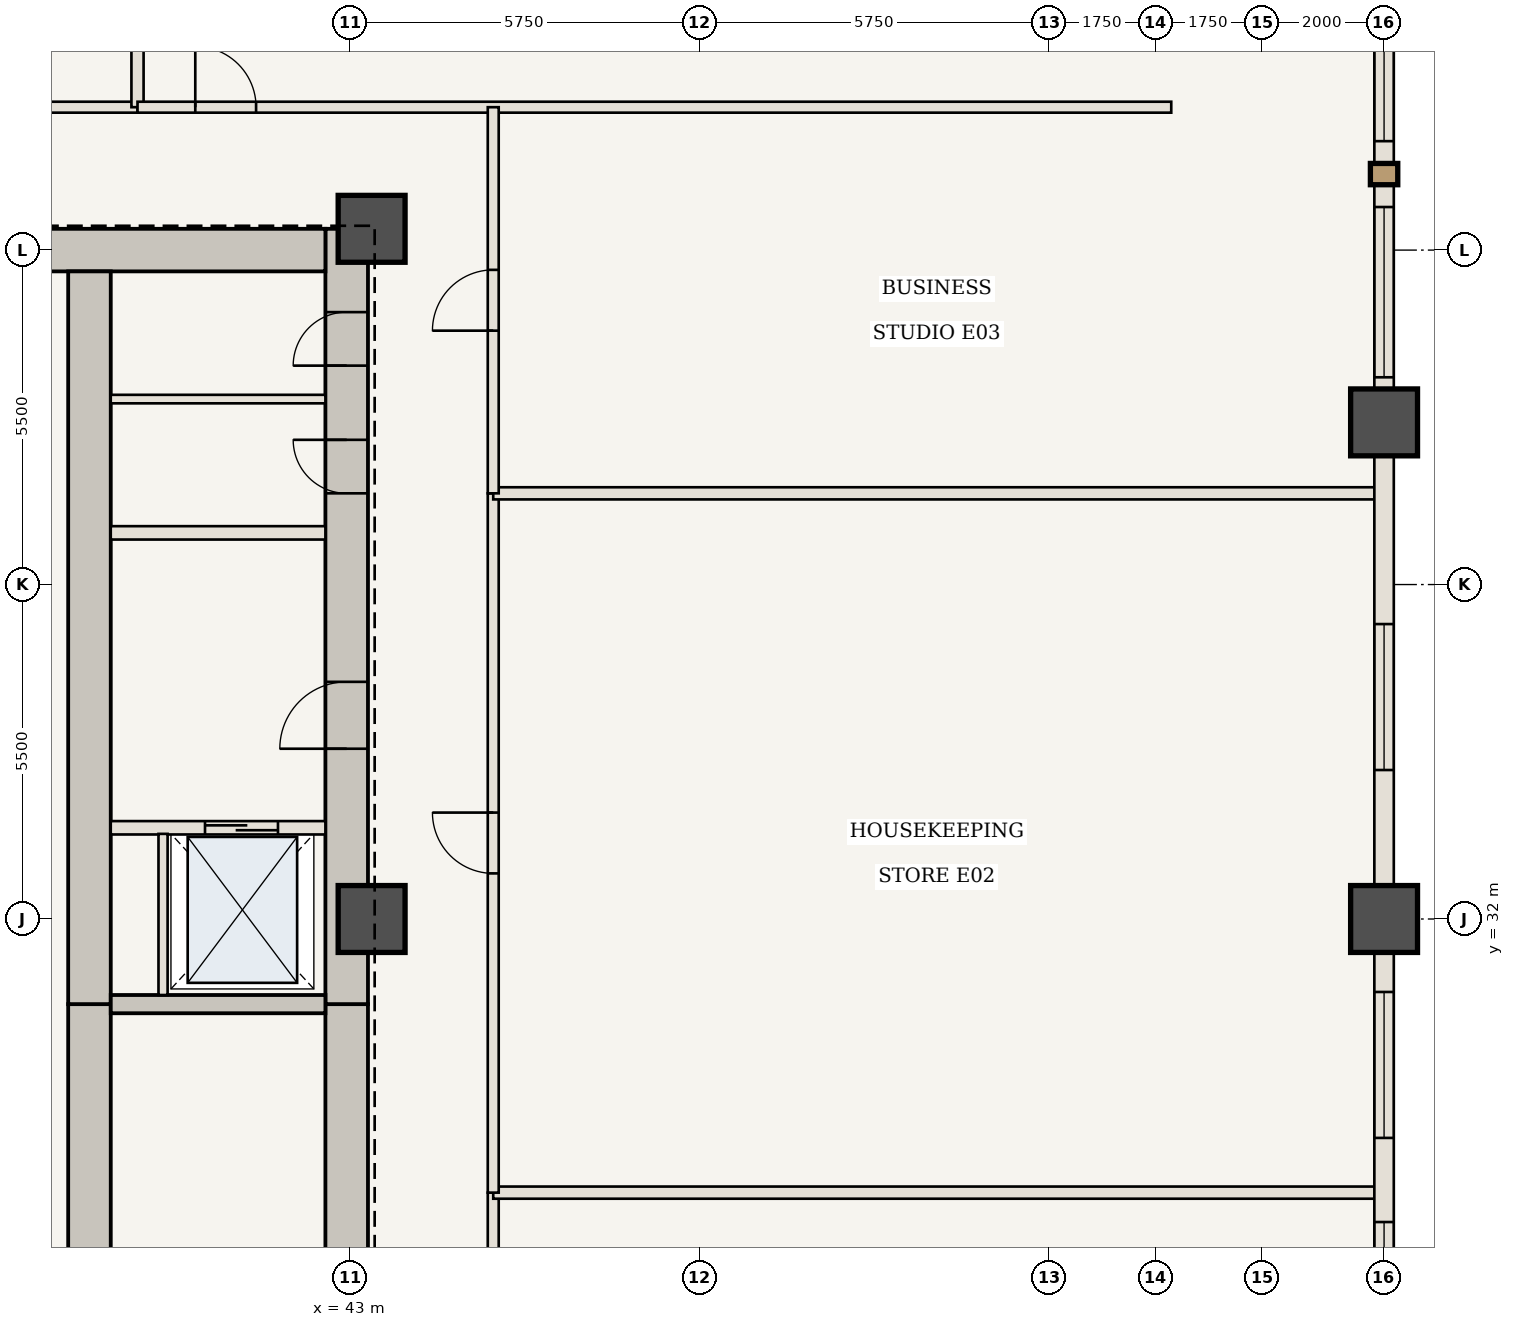
"""IFC4 building model, lengths in metres.
Left out: names, types, materials, properties, quantities, classifications, styles, units other than length and angle.
Written with IfcOpenShell. Run it as: python <this file> out.ifc"""

import sys

from ifc_helpers import new_model, si_unit, direction, frame, frame_2d, origin, origin_2d, place, context, subcontext, project, spatial, rectangle, extrude, element, fill, save


model = new_model("IFC4")
c1 = context("Model", 3, precision=1e-05, world=origin(), true_north=direction((0.0, 1.0)))
c2 = subcontext(c1, "Body", "Model", "MODEL_VIEW")
j1 = project(units=[si_unit("LENGTHUNIT", "METRE"), si_unit("PLANEANGLEUNIT", "RADIAN")], contexts=[c1])
p1 = place(None, origin())
s1 = spatial("IfcSite", under=j1, at=p1, CompositionType="ELEMENT")
p2 = place(p1, origin())
s2 = spatial("IfcBuilding", under=s1, at=p2, CompositionType="ELEMENT")
p3 = place(p2, frame((0.0, 0.0, 59.85)))
s3 = spatial("IfcBuildingStorey", under=s2, at=p3, CompositionType="ELEMENT", Elevation=59.85)
p4 = place(p3, frame((42.94, 20.6, 0.0), z_axis=(0.0, 0.0, 1.0), x_axis=(0.0, 1.0, 0.0)))
e1 = element("IfcWall", 1, at=p4, inside=s3, PredefinedType="SHEAR", context=c2, shape_type="SweptSolid", body=[
    extrude(rectangle(XDim=10.0, YDim=0.7, at=frame_2d((5.0, 0.0))), origin(), (0.0, 0.0, 1.0), 3.5),
])
p5 = place(p4, frame((1.15, 0.0, 0.0)))
e2 = element("IfcOpeningElement", 2, at=p5, cuts=e1, PredefinedType="OPENING", context=c2, shape_type="SweptSolid", body=[
    extrude(rectangle(XDim=1.15, YDim=2.15, at=frame_2d((0.575, 1.075))), frame((0.0, 0.36, 0.0), z_axis=(0.0, -1.0, 0.0), x_axis=(1.0, 0.0, 0.0)), (0.0, 0.0, 1.0), 0.72),
])
p6 = place(p3, frame((42.94, 30.6, 0.0), z_axis=(0.0, 0.0, 1.0), x_axis=(0.0, 1.0, 0.0)))
e3 = element("IfcWall", 3, at=p6, inside=s3, PredefinedType="SHEAR", context=c2, shape_type="SweptSolid", body=[
    extrude(rectangle(XDim=12.75, YDim=0.7, at=frame_2d((6.375, 0.0))), origin(), (0.0, 0.0, 1.0), 3.5),
])
p7 = place(p6, frame((4.2, 0.0, 0.0)))
e4 = element("IfcOpeningElement", 4, at=p7, cuts=e3, PredefinedType="OPENING", context=c2, shape_type="SweptSolid", body=[
    extrude(rectangle(XDim=1.1, YDim=2.15, at=frame_2d((0.55, 1.075))), frame((0.0, 0.36, 0.0), z_axis=(0.0, -1.0, 0.0), x_axis=(1.0, 0.0, 0.0)), (0.0, 0.0, 1.0), 0.72),
])
p8 = place(p6, frame((8.4, 0.0, 0.0)))
e5 = element("IfcOpeningElement", 5, at=p8, cuts=e3, PredefinedType="OPENING", context=c2, shape_type="SweptSolid", body=[
    extrude(rectangle(XDim=0.88, YDim=2.1, at=frame_2d((0.44, 1.05))), frame((0.0, 0.36, 0.0), z_axis=(0.0, -1.0, 0.0), x_axis=(1.0, 0.0, 0.0)), (0.0, 0.0, 1.0), 0.72),
])
p9 = place(p6, frame((10.5, 0.0, 0.0)))
e6 = element("IfcOpeningElement", 6, at=p9, cuts=e3, PredefinedType="OPENING", context=c2, shape_type="SweptSolid", body=[
    extrude(rectangle(XDim=0.88, YDim=2.1, at=frame_2d((0.44, 1.05))), frame((0.0, 0.36, 0.0), z_axis=(0.0, -1.0, 0.0), x_axis=(1.0, 0.0, 0.0)), (0.0, 0.0, 1.0), 0.72),
])
p10 = place(p3, frame((37.75, 43.0, 0.0), z_axis=(0.0, 0.0, 1.0), x_axis=(1.0, 0.0, 0.0)))
e7 = element("IfcWall", 7, at=p10, inside=s3, PredefinedType="SHEAR", context=c2, shape_type="SweptSolid", body=[
    extrude(rectangle(XDim=4.84, YDim=0.7, at=frame_2d((2.42, 0.0))), origin(), (0.0, 0.0, 1.0), 3.5),
])
p11 = place(p3, frame((38.71, 21.3, 0.0), z_axis=(0.0, 0.0, 1.0), x_axis=(0.0, 1.0, 0.0)))
e8 = element("IfcWall", 8, at=p11, inside=s3, PredefinedType="SHEAR", context=c2, shape_type="SweptSolid", body=[
    extrude(rectangle(XDim=9.3, YDim=0.7, at=frame_2d((4.65, 0.0))), origin(), (0.0, 0.0, 1.0), 3.5),
])
p12 = place(p3, frame((38.71, 30.6, 0.0), z_axis=(0.0, 0.0, 1.0), x_axis=(0.0, 1.0, 0.0)))
e9 = element("IfcWall", 9, at=p12, inside=s3, PredefinedType="SHEAR", context=c2, shape_type="SweptSolid", body=[
    extrude(rectangle(XDim=12.05, YDim=0.7, at=frame_2d((6.025, 0.0))), origin(), (0.0, 0.0, 1.0), 3.5),
])
for number, where, z_axis, x_axis in (
    (10, (43.35, 32.0, 0.0), (0.0, 0.0, 1.0), (1.0, 0.0, 0.0)),
    (11, (43.35, 43.35, 0.0), (0.0, 0.0, 1.0), (1.0, 0.0, 0.0)),
    (12, (60.0, 32.0, 0.0), (0.0, 0.0, 1.0), (1.0, 0.0, 0.0)),
    (13, (60.0, 40.167, 0.0), (0.0, 0.0, 1.0), (1.0, 0.0, 0.0)),
):
    element("IfcColumn", number, at=place(p3, frame(where, z_axis=z_axis, x_axis=x_axis)), inside=s3, PredefinedType="COLUMN", context=c2, shape_type="SweptSolid", body=[
        extrude(rectangle(XDim=1.1, YDim=1.1, at=origin_2d()), origin(), (0.0, 0.0, 1.0), 3.5),
    ])
p13 = place(p3, frame((39.06, 30.6, 0.0), z_axis=(0.0, 0.0, 1.0), x_axis=(1.0, 0.0, 0.0)))
e14 = element("IfcWall", 14, at=p13, inside=s3, PredefinedType="SHEAR", context=c2, shape_type="SweptSolid", body=[
    extrude(rectangle(XDim=3.53, YDim=0.3, at=frame_2d((1.765, 0.0))), origin(), (0.0, 0.0, 1.0), 3.32),
])
p14 = place(p3, frame((39.06, 33.5, 0.0), z_axis=(0.0, 0.0, 1.0), x_axis=(1.0, 0.0, 0.0)))
e15 = element("IfcWall", 15, at=p14, inside=s3, PredefinedType="STANDARD", context=c2, shape_type="SweptSolid", body=[
    extrude(rectangle(XDim=3.53, YDim=0.22, at=frame_2d((1.765, 0.0))), origin(), (0.0, 0.0, 1.0), 3.32),
])
p15 = place(p14, frame((1.55, 0.0, 0.0)))
e16 = element("IfcOpeningElement", 16, at=p15, cuts=e15, PredefinedType="OPENING", context=c2, shape_type="SweptSolid", body=[
    extrude(rectangle(XDim=1.2, YDim=2.2, at=frame_2d((0.6, 1.1))), frame((0.0, 0.12, 0.0), z_axis=(0.0, -1.0, 0.0), x_axis=(1.0, 0.0, 0.0)), (0.0, 0.0, 1.0), 0.24),
])
p16 = place(p3, frame((39.92, 30.75, 0.0), z_axis=(0.0, 0.0, 1.0), x_axis=(0.0, 1.0, 0.0)))
e17 = element("IfcWall", 17, at=p16, inside=s3, PredefinedType="STANDARD", context=c2, shape_type="SweptSolid", body=[
    extrude(rectangle(XDim=2.65, YDim=0.15, at=frame_2d((1.325, 0.0))), origin(), (0.0, 0.0, 1.0), 3.32),
])
p17 = place(p3, frame((39.06, 38.35, 0.0), z_axis=(0.0, 0.0, 1.0), x_axis=(1.0, 0.0, 0.0)))
e18 = element("IfcWall", 18, at=p17, inside=s3, PredefinedType="STANDARD", context=c2, shape_type="SweptSolid", body=[
    extrude(rectangle(XDim=3.53, YDim=0.22, at=frame_2d((1.765, 0.0))), origin(), (0.0, 0.0, 1.0), 3.32),
])
p18 = place(p3, frame((39.06, 40.55, 0.0), z_axis=(0.0, 0.0, 1.0), x_axis=(1.0, 0.0, 0.0)))
e19 = element("IfcWall", 19, at=p18, inside=s3, PredefinedType="STANDARD", context=c2, shape_type="SweptSolid", body=[
    extrude(rectangle(XDim=3.53, YDim=0.14, at=frame_2d((1.765, 0.0))), origin(), (0.0, 0.0, 1.0), 3.32),
])
p19 = place(p3, frame((25.5, 45.35, 0.0), z_axis=(0.0, 0.0, 1.0), x_axis=(1.0, 0.0, 0.0)))
e20 = element("IfcWall", 20, at=p19, inside=s3, PredefinedType="STANDARD", context=c2, shape_type="SweptSolid", body=[
    extrude(rectangle(XDim=14.0, YDim=0.18, at=frame_2d((7.0, 0.0))), origin(), (0.0, 0.0, 1.0), 3.32),
])
p20 = place(p19, frame((7.95, 0.0, 0.0)))
e21 = element("IfcOpeningElement", 21, at=p20, cuts=e20, PredefinedType="OPENING", context=c2, shape_type="SweptSolid", body=[
    extrude(rectangle(XDim=1.0, YDim=2.15, at=frame_2d((0.5, 1.075))), frame((0.0, 0.1, 0.0), z_axis=(0.0, -1.0, 0.0), x_axis=(1.0, 0.0, 0.0)), (0.0, 0.0, 1.0), 0.2),
])
p21 = place(p3, frame((39.5, 45.35, 0.0), z_axis=(0.0, 0.0, 1.0), x_axis=(0.0, 1.0, 0.0)))
e22 = element("IfcWall", 22, at=p21, inside=s3, PredefinedType="STANDARD", context=c2, shape_type="SweptSolid", body=[
    extrude(rectangle(XDim=14.59, YDim=0.2, at=frame_2d((7.295, 0.0))), origin(), (0.0, 0.0, 1.0), 3.32),
])
p22 = place(p3, frame((39.5, 45.35, 0.0), z_axis=(0.0, 0.0, 1.0), x_axis=(1.0, 0.0, 0.0)))
e23 = element("IfcWall", 23, at=p22, inside=s3, PredefinedType="STANDARD", context=c2, shape_type="SweptSolid", body=[
    extrude(rectangle(XDim=17.0, YDim=0.18, at=frame_2d((8.5, 0.0))), origin(), (0.0, 0.0, 1.0), 3.32),
])
p23 = place(p22, frame((0.95, 0.0, 0.0)))
e24 = element("IfcOpeningElement", 24, at=p23, cuts=e23, PredefinedType="OPENING", context=c2, shape_type="SweptSolid", body=[
    extrude(rectangle(XDim=1.0, YDim=2.15, at=frame_2d((0.5, 1.075))), frame((0.0, 0.1, 0.0), z_axis=(0.0, -1.0, 0.0), x_axis=(1.0, 0.0, 0.0)), (0.0, 0.0, 1.0), 0.2),
])
p24 = place(p3, frame((45.35, 18.65, 0.0), z_axis=(0.0, 0.0, 1.0), x_axis=(0.0, 1.0, 0.0)))
e25 = element("IfcWall", 25, at=p24, inside=s3, PredefinedType="STANDARD", context=c2, shape_type="SweptSolid", body=[
    extrude(rectangle(XDim=8.85, YDim=0.18, at=frame_2d((4.425, 0.0))), origin(), (0.0, 0.0, 1.0), 3.32),
])
p25 = place(p24, frame((3.925, 0.0, 0.0)))
e26 = element("IfcOpeningElement", 26, at=p25, cuts=e25, PredefinedType="OPENING", context=c2, shape_type="SweptSolid", body=[
    extrude(rectangle(XDim=1.0, YDim=2.15, at=frame_2d((0.5, 1.075))), frame((0.0, 0.1, 0.0), z_axis=(0.0, -1.0, 0.0), x_axis=(1.0, 0.0, 0.0)), (0.0, 0.0, 1.0), 0.2),
])
p26 = place(p3, frame((45.35, 27.5, 0.0), z_axis=(0.0, 0.0, 1.0), x_axis=(1.0, 0.0, 0.0)))
e27 = element("IfcWall", 27, at=p26, inside=s3, PredefinedType="STANDARD", context=c2, shape_type="SweptSolid", body=[
    extrude(rectangle(XDim=14.59, YDim=0.2, at=frame_2d((7.295, 0.0))), origin(), (0.0, 0.0, 1.0), 3.32),
])
p27 = place(p3, frame((45.35, 27.5, 0.0), z_axis=(0.0, 0.0, 1.0), x_axis=(0.0, 1.0, 0.0)))
e28 = element("IfcWall", 28, at=p27, inside=s3, PredefinedType="STANDARD", context=c2, shape_type="SweptSolid", body=[
    extrude(rectangle(XDim=11.5, YDim=0.18, at=frame_2d((5.75, 0.0))), origin(), (0.0, 0.0, 1.0), 3.32),
])
p28 = place(p27, frame((5.25, 0.0, 0.0)))
e29 = element("IfcOpeningElement", 29, at=p28, cuts=e28, PredefinedType="OPENING", context=c2, shape_type="SweptSolid", body=[
    extrude(rectangle(XDim=1.0, YDim=2.15, at=frame_2d((0.5, 1.075))), frame((0.0, 0.1, 0.0), z_axis=(0.0, -1.0, 0.0), x_axis=(1.0, 0.0, 0.0)), (0.0, 0.0, 1.0), 0.2),
])
p29 = place(p3, frame((45.35, 39.0, 0.0), z_axis=(0.0, 0.0, 1.0), x_axis=(1.0, 0.0, 0.0)))
e30 = element("IfcWall", 30, at=p29, inside=s3, PredefinedType="STANDARD", context=c2, shape_type="SweptSolid", body=[
    extrude(rectangle(XDim=14.59, YDim=0.2, at=frame_2d((7.295, 0.0))), origin(), (0.0, 0.0, 1.0), 3.32),
])
p30 = place(p3, frame((45.35, 39.0, 0.0), z_axis=(0.0, 0.0, 1.0), x_axis=(0.0, 1.0, 0.0)))
e31 = element("IfcWall", 31, at=p30, inside=s3, PredefinedType="STANDARD", context=c2, shape_type="SweptSolid", body=[
    extrude(rectangle(XDim=6.35, YDim=0.18, at=frame_2d((3.175, 0.0))), origin(), (0.0, 0.0, 1.0), 3.32),
])
p31 = place(p30, frame((2.675, 0.0, 0.0)))
e32 = element("IfcOpeningElement", 32, at=p31, cuts=e31, PredefinedType="OPENING", context=c2, shape_type="SweptSolid", body=[
    extrude(rectangle(XDim=1.0, YDim=2.15, at=frame_2d((0.5, 1.075))), frame((0.0, 0.1, 0.0), z_axis=(0.0, -1.0, 0.0), x_axis=(1.0, 0.0, 0.0)), (0.0, 0.0, 1.0), 0.2),
])
p32 = place(p3, frame((60.0, 32.0, 0.0), z_axis=(0.0, 0.0, 1.0), x_axis=(0.0, -1.0, 0.0)))
e33 = element("IfcWall", 33, at=p32, inside=s3, PredefinedType="USERDEFINED", context=c2, shape_type="SweptSolid", body=[
    extrude(rectangle(XDim=8.167, YDim=0.32, at=frame_2d((4.083, 0.0))), origin(), (0.0, 0.0, 1.0), 2.52),
])
p33 = place(p32, frame((1.2, 0.0, 0.85)))
e34 = element("IfcOpeningElement", 34, at=p33, cuts=e33, PredefinedType="OPENING", context=c2, shape_type="SweptSolid", body=[
    extrude(rectangle(XDim=2.4, YDim=1.47, at=frame_2d((1.2, 0.735))), frame((0.0, 0.17, 0.0), z_axis=(0.0, -1.0, 0.0), x_axis=(1.0, 0.0, 0.0)), (0.0, 0.0, 1.0), 0.34),
])
p34 = place(p32, frame((4.983, 0.0, 0.85)))
e35 = element("IfcOpeningElement", 35, at=p34, cuts=e33, PredefinedType="OPENING", context=c2, shape_type="SweptSolid", body=[
    extrude(rectangle(XDim=2.4, YDim=1.47, at=frame_2d((1.2, 0.735))), frame((0.0, 0.17, 0.0), z_axis=(0.0, -1.0, 0.0), x_axis=(1.0, 0.0, 0.0)), (0.0, 0.0, 1.0), 0.34),
])
p35 = place(p3, frame((60.0, 40.167, 0.0), z_axis=(0.0, 0.0, 1.0), x_axis=(0.0, -1.0, 0.0)))
e36 = element("IfcWall", 36, at=p35, inside=s3, PredefinedType="USERDEFINED", context=c2, shape_type="SweptSolid", body=[
    extrude(rectangle(XDim=8.167, YDim=0.32, at=frame_2d((4.083, 0.0))), origin(), (0.0, 0.0, 1.0), 2.52),
])
p36 = place(p35, frame((3.317, 0.0, 0.85)))
e37 = element("IfcOpeningElement", 37, at=p36, cuts=e36, PredefinedType="OPENING", context=c2, shape_type="SweptSolid", body=[
    extrude(rectangle(XDim=2.4, YDim=1.47, at=frame_2d((1.2, 0.735))), frame((0.0, 0.17, 0.0), z_axis=(0.0, -1.0, 0.0), x_axis=(1.0, 0.0, 0.0)), (0.0, 0.0, 1.0), 0.34),
])
p37 = place(p3, frame((60.0, 48.333, 0.0), z_axis=(0.0, 0.0, 1.0), x_axis=(0.0, -1.0, 0.0)))
e38 = element("IfcWall", 38, at=p37, inside=s3, PredefinedType="USERDEFINED", context=c2, shape_type="SweptSolid", body=[
    extrude(rectangle(XDim=8.167, YDim=0.32, at=frame_2d((4.083, 0.0))), origin(), (0.0, 0.0, 1.0), 2.52),
])
p38 = place(p37, frame((0.742, 0.0, 0.85)))
e39 = element("IfcOpeningElement", 39, at=p38, cuts=e38, PredefinedType="OPENING", context=c2, shape_type="SweptSolid", body=[
    extrude(rectangle(XDim=2.8, YDim=1.47, at=frame_2d((1.4, 0.735))), frame((0.0, 0.17, 0.0), z_axis=(0.0, -1.0, 0.0), x_axis=(1.0, 0.0, 0.0)), (0.0, 0.0, 1.0), 0.34),
])
p39 = place(p37, frame((4.625, 0.0, 0.85)))
e40 = element("IfcOpeningElement", 40, at=p39, cuts=e38, PredefinedType="OPENING", context=c2, shape_type="SweptSolid", body=[
    extrude(rectangle(XDim=2.8, YDim=1.47, at=frame_2d((1.4, 0.735))), frame((0.0, 0.17, 0.0), z_axis=(0.0, -1.0, 0.0), x_axis=(1.0, 0.0, 0.0)), (0.0, 0.0, 1.0), 0.34),
])
p40 = place(p7, origin())
e41 = element("IfcDoor", 41, at=p40, inside=s3, OperationType="SINGLE_SWING_LEFT", PredefinedType="DOOR", context=c2, shape_type="SweptSolid", body=[
    extrude(rectangle(XDim=1.1, YDim=2.15, at=frame_2d((0.55, 1.075))), frame((0.0, 0.025, 0.0), z_axis=(0.0, -1.0, 0.0), x_axis=(1.0, 0.0, 0.0)), (0.0, 0.0, 1.0), 0.05),
])
fill(e4, e41)
p41 = place(p8, origin())
e42 = element("IfcDoor", 42, at=p41, inside=s3, OperationType="SINGLE_SWING_RIGHT", PredefinedType="DOOR", context=c2, shape_type="SweptSolid", body=[
    extrude(rectangle(XDim=0.88, YDim=2.1, at=frame_2d((0.44, 1.05))), frame((0.0, 0.025, 0.0), z_axis=(0.0, -1.0, 0.0), x_axis=(1.0, 0.0, 0.0)), (0.0, 0.0, 1.0), 0.05),
])
fill(e5, e42)
p42 = place(p9, origin())
e43 = element("IfcDoor", 43, at=p42, inside=s3, OperationType="SINGLE_SWING_LEFT", PredefinedType="DOOR", context=c2, shape_type="SweptSolid", body=[
    extrude(rectangle(XDim=0.88, YDim=2.1, at=frame_2d((0.44, 1.05))), frame((0.0, 0.025, 0.0), z_axis=(0.0, -1.0, 0.0), x_axis=(1.0, 0.0, 0.0)), (0.0, 0.0, 1.0), 0.05),
])
fill(e6, e43)
p43 = place(p15, origin())
e44 = element("IfcDoor", 44, at=p43, inside=s3, OperationType="DOUBLE_DOOR_SLIDING", PredefinedType="DOOR", context=c2, shape_type="SweptSolid", body=[
    extrude(rectangle(XDim=1.2, YDim=2.2, at=frame_2d((0.6, 1.1))), frame((0.0, 0.025, 0.0), z_axis=(0.0, -1.0, 0.0), x_axis=(1.0, 0.0, 0.0)), (0.0, 0.0, 1.0), 0.05),
])
fill(e16, e44)
p44 = place(p23, origin())
e45 = element("IfcDoor", 45, at=p44, inside=s3, OperationType="SINGLE_SWING_LEFT", PredefinedType="DOOR", context=c2, shape_type="SweptSolid", body=[
    extrude(rectangle(XDim=1.0, YDim=2.15, at=frame_2d((0.5, 1.075))), frame((0.0, 0.025, 0.0), z_axis=(0.0, -1.0, 0.0), x_axis=(1.0, 0.0, 0.0)), (0.0, 0.0, 1.0), 0.05),
])
fill(e24, e45)
p45 = place(p28, origin())
e46 = element("IfcDoor", 46, at=p45, inside=s3, OperationType="SINGLE_SWING_RIGHT", PredefinedType="DOOR", context=c2, shape_type="SweptSolid", body=[
    extrude(rectangle(XDim=1.0, YDim=2.15, at=frame_2d((0.5, 1.075))), frame((0.0, 0.025, 0.0), z_axis=(0.0, -1.0, 0.0), x_axis=(1.0, 0.0, 0.0)), (0.0, 0.0, 1.0), 0.05),
])
fill(e29, e46)
p46 = place(p31, origin())
e47 = element("IfcDoor", 47, at=p46, inside=s3, OperationType="SINGLE_SWING_LEFT", PredefinedType="DOOR", context=c2, shape_type="SweptSolid", body=[
    extrude(rectangle(XDim=1.0, YDim=2.15, at=frame_2d((0.5, 1.075))), frame((0.0, 0.025, 0.0), z_axis=(0.0, -1.0, 0.0), x_axis=(1.0, 0.0, 0.0)), (0.0, 0.0, 1.0), 0.05),
])
fill(e32, e47)
p47 = place(p33, origin())
e48 = element("IfcWindow", 48, at=p47, inside=s3, PartitioningType="SINGLE_PANEL", PredefinedType="WINDOW", context=c2, shape_type="SweptSolid", body=[
    extrude(rectangle(XDim=2.4, YDim=1.47, at=frame_2d((1.2, 0.735))), frame((0.0, 0.03, 0.0), z_axis=(0.0, -1.0, 0.0), x_axis=(1.0, 0.0, 0.0)), (0.0, 0.0, 1.0), 0.06),
])
fill(e34, e48)
p48 = place(p34, origin())
e49 = element("IfcWindow", 49, at=p48, inside=s3, PartitioningType="SINGLE_PANEL", PredefinedType="WINDOW", context=c2, shape_type="SweptSolid", body=[
    extrude(rectangle(XDim=2.4, YDim=1.47, at=frame_2d((1.2, 0.735))), frame((0.0, 0.03, 0.0), z_axis=(0.0, -1.0, 0.0), x_axis=(1.0, 0.0, 0.0)), (0.0, 0.0, 1.0), 0.06),
])
fill(e35, e49)
p49 = place(p36, origin())
e50 = element("IfcWindow", 50, at=p49, inside=s3, PartitioningType="SINGLE_PANEL", PredefinedType="WINDOW", context=c2, shape_type="SweptSolid", body=[
    extrude(rectangle(XDim=2.4, YDim=1.47, at=frame_2d((1.2, 0.735))), frame((0.0, 0.03, 0.0), z_axis=(0.0, -1.0, 0.0), x_axis=(1.0, 0.0, 0.0)), (0.0, 0.0, 1.0), 0.06),
])
fill(e37, e50)
p50 = place(p38, origin())
e51 = element("IfcWindow", 51, at=p50, inside=s3, PartitioningType="SINGLE_PANEL", PredefinedType="WINDOW", context=c2, shape_type="SweptSolid", body=[
    extrude(rectangle(XDim=2.8, YDim=1.47, at=frame_2d((1.4, 0.735))), frame((0.0, 0.03, 0.0), z_axis=(0.0, -1.0, 0.0), x_axis=(1.0, 0.0, 0.0)), (0.0, 0.0, 1.0), 0.06),
])
fill(e39, e51)
p51 = place(p39, origin())
e52 = element("IfcWindow", 52, at=p51, inside=s3, PartitioningType="SINGLE_PANEL", PredefinedType="WINDOW", context=c2, shape_type="SweptSolid", body=[
    extrude(rectangle(XDim=2.8, YDim=1.47, at=frame_2d((1.4, 0.735))), frame((0.0, 0.03, 0.0), z_axis=(0.0, -1.0, 0.0), x_axis=(1.0, 0.0, 0.0)), (0.0, 0.0, 1.0), 0.06),
])
fill(e40, e52)
save(model, sys.argv[1])
